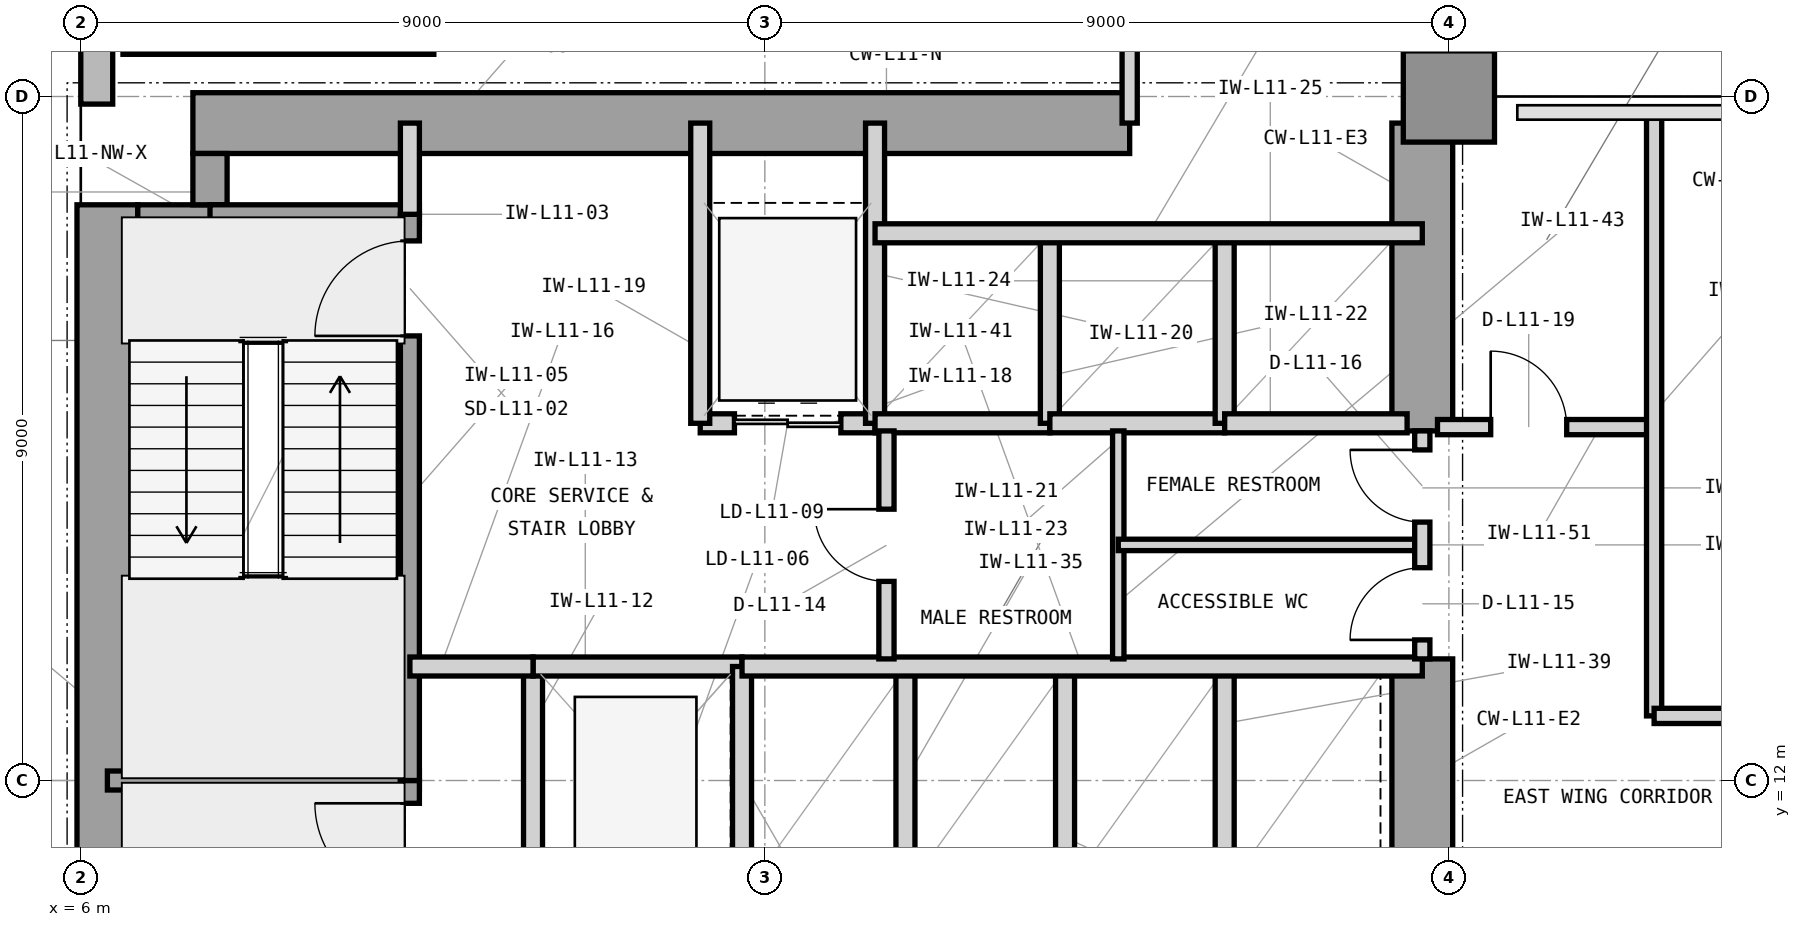
"""IFC4 building model, lengths in metres.
Left out: names, types, materials, properties, quantities, classifications, styles, units other than length and angle.
Written with IfcOpenShell. Run it as: python <this file> out.ifc"""

import sys

from ifc_helpers import new_model, si_unit, direction, frame, frame_2d, origin, origin_2d, place, context, subcontext, project, spatial, rectangle, extrude, element, fill, save


model = new_model("IFC4")
c1 = context("Model", 3, precision=1e-05, world=origin(), true_north=direction((0.0, 1.0)))
c2 = subcontext(c1, "Body", "Model", "MODEL_VIEW")
j1 = project(units=[si_unit("LENGTHUNIT", "METRE"), si_unit("PLANEANGLEUNIT", "RADIAN")], contexts=[c1])
p1 = place(None, origin())
s1 = spatial("IfcSite", under=j1, at=p1, CompositionType="ELEMENT")
p2 = place(p1, origin())
s2 = spatial("IfcBuilding", under=s1, at=p2, CompositionType="ELEMENT")
p3 = place(p2, frame((0.0, 0.0, 51.0)))
s3 = spatial("IfcBuildingStorey", under=s2, at=p3, CompositionType="ELEMENT", Elevation=51.0)
p4 = place(p3, frame((6.35, 4.425, 0.0), z_axis=(0.0, 0.0, 1.0), x_axis=(0.0, 1.0, 0.0)))
e1 = element("IfcWall", 1, at=p4, inside=s3, PredefinedType="SHEAR", context=c2, shape_type="SweptSolid", body=[
    extrude(rectangle(XDim=15.15, YDim=0.8, at=frame_2d((7.575, 0.0))), origin(), (0.0, 0.0, 1.0), 4.2),
])
p5 = place(p3, frame((7.475, 20.65, 0.0), z_axis=(0.0, 0.0, 1.0), x_axis=(1.0, 0.0, 0.0)))
e2 = element("IfcWall", 2, at=p5, inside=s3, PredefinedType="SHEAR", context=c2, shape_type="SweptSolid", body=[
    extrude(rectangle(XDim=12.325, YDim=0.8, at=frame_2d((6.163, 0.0))), origin(), (0.0, 0.0, 1.0), 4.2),
])
p6 = place(p3, frame((23.65, 10.4, 0.0), z_axis=(0.0, 0.0, 1.0), x_axis=(0.0, 1.0, 0.0)))
e3 = element("IfcWall", 3, at=p6, inside=s3, PredefinedType="SHEAR", context=c2, shape_type="SweptSolid", body=[
    extrude(rectangle(XDim=3.2, YDim=0.8, at=frame_2d((1.6, 0.0))), origin(), (0.0, 0.0, 1.0), 4.2),
])
p7 = place(p3, frame((23.65, 16.6, 0.0), z_axis=(0.0, 0.0, 1.0), x_axis=(0.0, 1.0, 0.0)))
e4 = element("IfcWall", 4, at=p7, inside=s3, PredefinedType="SHEAR", context=c2, shape_type="SweptSolid", body=[
    extrude(rectangle(XDim=4.05, YDim=0.8, at=frame_2d((2.025, 0.0))), origin(), (0.0, 0.0, 1.0), 4.2),
])
p8 = place(p3, frame((6.75, 19.35, 0.0), z_axis=(0.0, 0.0, 1.0), x_axis=(1.0, 0.0, 0.0)))
e5 = element("IfcWall", 5, at=p8, inside=s3, PredefinedType="SHEAR", context=c2, shape_type="SweptSolid", body=[
    extrude(rectangle(XDim=1.175, YDim=0.45, at=frame_2d((0.587, 0.0))), origin(), (0.0, 0.0, 1.0), 4.2),
])
p9 = place(p3, frame((7.7, 19.575, 0.0), z_axis=(0.0, 0.0, 1.0), x_axis=(0.0, 1.0, 0.0)))
e6 = element("IfcWall", 6, at=p9, inside=s3, PredefinedType="SHEAR", context=c2, shape_type="SweptSolid", body=[
    extrude(rectangle(XDim=0.675, YDim=0.45, at=frame_2d((0.337, 0.0))), origin(), (0.0, 0.0, 1.0), 4.2),
])
p10 = place(p3, frame((24.0, 21.0, 0.0), z_axis=(0.0, 0.0, 1.0), x_axis=(1.0, 0.0, 0.0)))
e7 = element("IfcColumn", 7, at=p10, inside=s3, PredefinedType="COLUMN", context=c2, shape_type="SweptSolid", body=[
    extrude(rectangle(XDim=1.2, YDim=1.2, at=origin_2d()), origin(), (0.0, 0.0, 1.0), 4.2),
])
p11 = place(p3, frame((23.79, 21.0, 0.0), z_axis=(0.0, 0.0, 1.0), x_axis=(0.0, 1.0, 0.0)))
e8 = element("IfcWall", 8, at=p11, inside=s3, PredefinedType="STANDARD", context=c2, shape_type="SweptSolid", body=[
    extrude(rectangle(XDim=28.4, YDim=0.42, at=frame_2d((14.2, 0.0))), origin(), (0.0, 0.0, 1.0), 3.98),
])
p12 = place(p11, frame((10.433, 0.0, 0.85)))
e9 = element("IfcOpeningElement", 9, at=p12, cuts=e8, PredefinedType="OPENING", context=c2, shape_type="SweptSolid", body=[
    extrude(rectangle(XDim=2.8, YDim=2.45, at=frame_2d((1.4, 1.225))), frame((0.0, 0.22, 0.0), z_axis=(0.0, -1.0, 0.0), x_axis=(1.0, 0.0, 0.0)), (0.0, 0.0, 1.0), 0.44),
])
p13 = place(p3, frame((6.21, 49.4, 0.0), z_axis=(0.0, 0.0, 1.0), x_axis=(0.0, -1.0, 0.0)))
e10 = element("IfcWall", 10, at=p13, inside=s3, PredefinedType="STANDARD", context=c2, shape_type="SweptSolid", body=[
    extrude(rectangle(XDim=28.5, YDim=0.42, at=frame_2d((14.25, 0.0))), origin(), (0.0, 0.0, 1.0), 3.98),
])
p14 = place(p13, frame((15.225, 0.0, 0.85)))
e11 = element("IfcOpeningElement", 11, at=p14, cuts=e10, PredefinedType="OPENING", context=c2, shape_type="SweptSolid", body=[
    extrude(rectangle(XDim=2.8, YDim=2.45, at=frame_2d((1.4, 1.225))), frame((0.0, 0.22, 0.0), z_axis=(0.0, -1.0, 0.0), x_axis=(1.0, 0.0, 0.0)), (0.0, 0.0, 1.0), 0.44),
])
p15 = place(p13, frame((8.436, 0.0, 0.85)))
e12 = element("IfcOpeningElement", 12, at=p15, cuts=e10, PredefinedType="OPENING", context=c2, shape_type="SweptSolid", body=[
    extrude(rectangle(XDim=1.2, YDim=2.45, at=frame_2d((0.6, 1.225))), frame((0.0, 0.22, 0.0), z_axis=(0.0, -1.0, 0.0), x_axis=(1.0, 0.0, 0.0)), (0.0, 0.0, 1.0), 0.44),
])
p16 = place(p3, frame((6.35, 12.0, 0.0), z_axis=(0.0, 0.0, 1.0), x_axis=(1.0, 0.0, 0.0)))
e13 = element("IfcWall", 13, at=p16, inside=s3, PredefinedType="SHEAR", context=c2, shape_type="SweptSolid", body=[
    extrude(rectangle(XDim=4.105, YDim=0.25, at=frame_2d((2.052, 0.0))), origin(), (0.0, 0.0, 1.0), 4.2),
])
p17 = place(p3, frame((7.7, 19.45, 0.0), z_axis=(0.0, 0.0, 1.0), x_axis=(1.0, 0.0, 0.0)))
e14 = element("IfcWall", 14, at=p17, inside=s3, PredefinedType="SHEAR", context=c2, shape_type="SweptSolid", body=[
    extrude(rectangle(XDim=2.755, YDim=0.25, at=frame_2d((1.377, 0.0))), origin(), (0.0, 0.0, 1.0), 4.2),
])
p18 = place(p3, frame((10.33, 4.55, 0.0), z_axis=(0.0, 0.0, 1.0), x_axis=(0.0, 1.0, 0.0)))
e15 = element("IfcWall", 15, at=p18, inside=s3, PredefinedType="SHEAR", context=c2, shape_type="SweptSolid", body=[
    extrude(rectangle(XDim=7.45, YDim=0.25, at=frame_2d((3.725, 0.0))), origin(), (0.0, 0.0, 1.0), 4.2),
])
p19 = place(p18, frame((5.9, 0.0, 0.0)))
e16 = element("IfcOpeningElement", 16, at=p19, cuts=e15, PredefinedType="OPENING", context=c2, shape_type="SweptSolid", body=[
    extrude(rectangle(XDim=1.25, YDim=2.2, at=frame_2d((0.625, 1.1))), frame((0.0, 0.135, 0.0), z_axis=(0.0, -1.0, 0.0), x_axis=(1.0, 0.0, 0.0)), (0.0, 0.0, 1.0), 0.27),
])
p20 = place(p3, frame((10.33, 12.0, 0.0), z_axis=(0.0, 0.0, 1.0), x_axis=(0.0, 1.0, 0.0)))
e17 = element("IfcWall", 17, at=p20, inside=s3, PredefinedType="SHEAR", context=c2, shape_type="SweptSolid", body=[
    extrude(rectangle(XDim=7.45, YDim=0.25, at=frame_2d((3.725, 0.0))), origin(), (0.0, 0.0, 1.0), 4.2),
])
p21 = place(p20, frame((5.85, 0.0, 0.0)))
e18 = element("IfcOpeningElement", 18, at=p21, cuts=e17, PredefinedType="OPENING", context=c2, shape_type="SweptSolid", body=[
    extrude(rectangle(XDim=1.25, YDim=2.2, at=frame_2d((0.625, 1.1))), frame((0.0, 0.135, 0.0), z_axis=(0.0, -1.0, 0.0), x_axis=(1.0, 0.0, 0.0)), (0.0, 0.0, 1.0), 0.27),
])
p22 = place(p3, frame((10.33, 19.45, 0.0), z_axis=(0.0, 0.0, 1.0), x_axis=(0.0, 1.0, 0.0)))
e19 = element("IfcWall", 19, at=p22, inside=s3, PredefinedType="PARTITIONING", context=c2, shape_type="SweptSolid", body=[
    extrude(rectangle(XDim=1.2, YDim=0.25, at=frame_2d((0.6, 0.0))), origin(), (0.0, 0.0, 1.0), 3.114),
])
p23 = place(p3, frame((11.95, 10.5, 0.0), z_axis=(0.0, 0.0, 1.0), x_axis=(0.0, 1.0, 0.0)))
e20 = element("IfcWall", 20, at=p23, inside=s3, PredefinedType="PARTITIONING", context=c2, shape_type="SweptSolid", body=[
    extrude(rectangle(XDim=3.0, YDim=0.25, at=frame_2d((1.5, 0.0))), origin(), (0.0, 0.0, 1.0), 3.97),
])
p24 = place(p3, frame((11.95, 13.5, 0.0), z_axis=(0.0, 0.0, 1.0), x_axis=(1.0, 0.0, 0.0)))
e21 = element("IfcWall", 21, at=p24, inside=s3, PredefinedType="PARTITIONING", context=c2, shape_type="SweptSolid", body=[
    extrude(rectangle(XDim=2.75, YDim=0.25, at=frame_2d((1.375, 0.0))), origin(), (0.0, 0.0, 1.0), 3.426),
])
p25 = place(p3, frame((14.7, 10.5, 0.0), z_axis=(0.0, 0.0, 1.0), x_axis=(0.0, 1.0, 0.0)))
e22 = element("IfcWall", 22, at=p25, inside=s3, PredefinedType="PARTITIONING", context=c2, shape_type="SweptSolid", body=[
    extrude(rectangle(XDim=3.0, YDim=0.25, at=frame_2d((1.5, 0.0))), origin(), (0.0, 0.0, 1.0), 3.97),
])
p26 = place(p3, frame((10.33, 13.5, 0.0), z_axis=(0.0, 0.0, 1.0), x_axis=(1.0, 0.0, 0.0)))
e23 = element("IfcWall", 23, at=p26, inside=s3, PredefinedType="PARTITIONING", context=c2, shape_type="SweptSolid", body=[
    extrude(rectangle(XDim=1.62, YDim=0.25, at=frame_2d((0.81, 0.0))), origin(), (0.0, 0.0, 1.0), 3.426),
])
p27 = place(p3, frame((14.15, 16.7, 0.0), z_axis=(0.0, 0.0, 1.0), x_axis=(1.0, 0.0, 0.0)))
e24 = element("IfcWall", 24, at=p27, inside=s3, PredefinedType="PARTITIONING", context=c2, shape_type="SweptSolid", body=[
    extrude(rectangle(XDim=2.3, YDim=0.25, at=frame_2d((1.15, 0.0))), origin(), (0.0, 0.0, 1.0), 3.426),
])
p28 = place(p27, frame((0.45, 0.0, 0.0)))
e25 = element("IfcOpeningElement", 25, at=p28, cuts=e24, PredefinedType="OPENING", context=c2, shape_type="SweptSolid", body=[
    extrude(rectangle(XDim=1.4, YDim=2.35, at=frame_2d((0.7, 1.175))), frame((0.0, 0.135, 0.0), z_axis=(0.0, -1.0, 0.0), x_axis=(1.0, 0.0, 0.0)), (0.0, 0.0, 1.0), 0.27),
])
for number, where, z_axis, x_axis in (
    (26, (14.15, 16.7, 0.0), (0.0, 0.0, 1.0), (0.0, 1.0, 0.0)),
    (27, (16.45, 16.7, 0.0), (0.0, 0.0, 1.0), (0.0, 1.0, 0.0)),
):
    element("IfcWall", number, at=place(p3, frame(where, z_axis=z_axis, x_axis=x_axis)), inside=s3, PredefinedType="PARTITIONING", context=c2, shape_type="SweptSolid", body=[
        extrude(rectangle(XDim=3.95, YDim=0.25, at=frame_2d((1.975, 0.0))), origin(), (0.0, 0.0, 1.0), 3.97),
    ])
p29 = place(p3, frame((16.45, 16.7, 0.0), z_axis=(0.0, 0.0, 1.0), x_axis=(1.0, 0.0, 0.0)))
e28 = element("IfcWall", 28, at=p29, inside=s3, PredefinedType="PARTITIONING", context=c2, shape_type="SweptSolid", body=[
    extrude(rectangle(XDim=2.3, YDim=0.25, at=frame_2d((1.15, 0.0))), origin(), (0.0, 0.0, 1.0), 3.426),
])
p30 = place(p3, frame((18.75, 16.7, 0.0), z_axis=(0.0, 0.0, 1.0), x_axis=(0.0, 1.0, 0.0)))
e29 = element("IfcWall", 29, at=p30, inside=s3, PredefinedType="PARTITIONING", context=c2, shape_type="SweptSolid", body=[
    extrude(rectangle(XDim=2.5, YDim=0.25, at=frame_2d((1.25, 0.0))), origin(), (0.0, 0.0, 1.0), 3.97),
])
p31 = place(p3, frame((18.75, 16.7, 0.0), z_axis=(0.0, 0.0, 1.0), x_axis=(1.0, 0.0, 0.0)))
e30 = element("IfcWall", 30, at=p31, inside=s3, PredefinedType="PARTITIONING", context=c2, shape_type="SweptSolid", body=[
    extrude(rectangle(XDim=2.3, YDim=0.25, at=frame_2d((1.15, 0.0))), origin(), (0.0, 0.0, 1.0), 3.426),
])
p32 = place(p3, frame((21.05, 16.7, 0.0), z_axis=(0.0, 0.0, 1.0), x_axis=(0.0, 1.0, 0.0)))
e31 = element("IfcWall", 31, at=p32, inside=s3, PredefinedType="PARTITIONING", context=c2, shape_type="SweptSolid", body=[
    extrude(rectangle(XDim=2.5, YDim=0.25, at=frame_2d((1.25, 0.0))), origin(), (0.0, 0.0, 1.0), 3.97),
])
p33 = place(p3, frame((21.05, 16.7, 0.0), z_axis=(0.0, 0.0, 1.0), x_axis=(1.0, 0.0, 0.0)))
e32 = element("IfcWall", 32, at=p33, inside=s3, PredefinedType="PARTITIONING", context=c2, shape_type="SweptSolid", body=[
    extrude(rectangle(XDim=2.4, YDim=0.25, at=frame_2d((1.2, 0.0))), origin(), (0.0, 0.0, 1.0), 3.426),
])
p34 = place(p3, frame((16.45, 19.2, 0.0), z_axis=(0.0, 0.0, 1.0), x_axis=(1.0, 0.0, 0.0)))
e33 = element("IfcWall", 33, at=p34, inside=s3, PredefinedType="PARTITIONING", context=c2, shape_type="SweptSolid", body=[
    extrude(rectangle(XDim=7.2, YDim=0.25, at=frame_2d((3.6, 0.0))), origin(), (0.0, 0.0, 1.0), 3.97),
])
for number, where, z_axis, x_axis in (
    (34, (16.85, 10.5, 0.0), (0.0, 0.0, 1.0), (0.0, 1.0, 0.0)),
    (35, (18.95, 10.5, 0.0), (0.0, 0.0, 1.0), (0.0, 1.0, 0.0)),
    (36, (21.05, 10.5, 0.0), (0.0, 0.0, 1.0), (0.0, 1.0, 0.0)),
):
    element("IfcWall", number, at=place(p3, frame(where, z_axis=z_axis, x_axis=x_axis)), inside=s3, PredefinedType="PARTITIONING", context=c2, shape_type="SweptSolid", body=[
        extrude(rectangle(XDim=3.0, YDim=0.25, at=frame_2d((1.5, 0.0))), origin(), (0.0, 0.0, 1.0), 3.97),
    ])
p35 = place(p3, frame((14.7, 13.5, 0.0), z_axis=(0.0, 0.0, 1.0), x_axis=(1.0, 0.0, 0.0)))
e37 = element("IfcWall", 37, at=p35, inside=s3, PredefinedType="PARTITIONING", context=c2, shape_type="SweptSolid", body=[
    extrude(rectangle(XDim=8.95, YDim=0.25, at=frame_2d((4.475, 0.0))), origin(), (0.0, 0.0, 1.0), 3.426),
])
p36 = place(p3, frame((16.6, 13.6, 0.0), z_axis=(0.0, 0.0, 1.0), x_axis=(0.0, 1.0, 0.0)))
e38 = element("IfcWall", 38, at=p36, inside=s3, PredefinedType="PARTITIONING", context=c2, shape_type="SweptSolid", body=[
    extrude(rectangle(XDim=3.0, YDim=0.2, at=frame_2d((1.5, 0.0))), origin(), (0.0, 0.0, 1.0), 3.97),
])
p37 = place(p36, frame((1.02, 0.0, 0.0)))
e39 = element("IfcOpeningElement", 39, at=p37, cuts=e38, PredefinedType="OPENING", context=c2, shape_type="SweptSolid", body=[
    extrude(rectangle(XDim=0.95, YDim=2.1, at=frame_2d((0.475, 1.05))), frame((0.0, 0.11, 0.0), z_axis=(0.0, -1.0, 0.0), x_axis=(1.0, 0.0, 0.0)), (0.0, 0.0, 1.0), 0.22),
])
p38 = place(p3, frame((19.65, 13.6, 0.0), z_axis=(0.0, 0.0, 1.0), x_axis=(0.0, 1.0, 0.0)))
e40 = element("IfcWall", 40, at=p38, inside=s3, PredefinedType="PARTITIONING", context=c2, shape_type="SweptSolid", body=[
    extrude(rectangle(XDim=3.0, YDim=0.15, at=frame_2d((1.5, 0.0))), origin(), (0.0, 0.0, 1.0), 3.97),
])
p39 = place(p3, frame((19.65, 15.1, 0.0), z_axis=(0.0, 0.0, 1.0), x_axis=(1.0, 0.0, 0.0)))
e41 = element("IfcWall", 41, at=p39, inside=s3, PredefinedType="PARTITIONING", context=c2, shape_type="SweptSolid", body=[
    extrude(rectangle(XDim=4.0, YDim=0.15, at=frame_2d((2.0, 0.0))), origin(), (0.0, 0.0, 1.0), 3.97),
])
p40 = place(p3, frame((23.65, 13.6, 0.0), z_axis=(0.0, 0.0, 1.0), x_axis=(0.0, 1.0, 0.0)))
e42 = element("IfcWall", 42, at=p40, inside=s3, PredefinedType="PARTITIONING", context=c2, shape_type="SweptSolid", body=[
    extrude(rectangle(XDim=3.0, YDim=0.2, at=frame_2d((1.5, 0.0))), origin(), (0.0, 0.0, 1.0), 3.97),
])
p41 = place(p40, frame((0.25, 0.0, 0.0)))
e43 = element("IfcOpeningElement", 43, at=p41, cuts=e42, PredefinedType="OPENING", context=c2, shape_type="SweptSolid", body=[
    extrude(rectangle(XDim=0.95, YDim=2.1, at=frame_2d((0.475, 1.05))), frame((0.0, 0.11, 0.0), z_axis=(0.0, -1.0, 0.0), x_axis=(1.0, 0.0, 0.0)), (0.0, 0.0, 1.0), 0.22),
])
p42 = place(p40, frame((1.8, 0.0, 0.0)))
e44 = element("IfcOpeningElement", 44, at=p42, cuts=e42, PredefinedType="OPENING", context=c2, shape_type="SweptSolid", body=[
    extrude(rectangle(XDim=0.95, YDim=2.1, at=frame_2d((0.475, 1.05))), frame((0.0, 0.11, 0.0), z_axis=(0.0, -1.0, 0.0), x_axis=(1.0, 0.0, 0.0)), (0.0, 0.0, 1.0), 0.22),
])
p43 = place(p3, frame((6.555, 21.68, 0.0), z_axis=(0.0, 0.0, 1.0), x_axis=(1.0, 0.0, 0.0)))
e45 = element("IfcWall", 45, at=p43, inside=s3, PredefinedType="SHEAR", context=c2, shape_type="SweptSolid", body=[
    extrude(rectangle(XDim=4.09, YDim=0.25, at=frame_2d((2.045, 0.0))), origin(), (0.0, 0.0, 1.0), 4.2),
])
p44 = place(p3, frame((23.85, 16.65, 0.0), z_axis=(0.0, 0.0, 1.0), x_axis=(1.0, 0.0, 0.0)))
e46 = element("IfcWall", 46, at=p44, inside=s3, PredefinedType="PARTITIONING", context=c2, shape_type="SweptSolid", body=[
    extrude(rectangle(XDim=2.85, YDim=0.2, at=frame_2d((1.425, 0.0))), origin(), (0.0, 0.0, 1.0), 3.97),
])
p45 = place(p44, frame((0.7, 0.0, 0.0)))
e47 = element("IfcOpeningElement", 47, at=p45, cuts=e46, PredefinedType="OPENING", context=c2, shape_type="SweptSolid", body=[
    extrude(rectangle(XDim=1.0, YDim=2.15, at=frame_2d((0.5, 1.075))), frame((0.0, 0.11, 0.0), z_axis=(0.0, -1.0, 0.0), x_axis=(1.0, 0.0, 0.0)), (0.0, 0.0, 1.0), 0.22),
])
p46 = place(p3, frame((26.7, 12.85, 0.0), z_axis=(0.0, 0.0, 1.0), x_axis=(0.0, 1.0, 0.0)))
e48 = element("IfcWall", 48, at=p46, inside=s3, PredefinedType="PARTITIONING", context=c2, shape_type="SweptSolid", body=[
    extrude(rectangle(XDim=7.97, YDim=0.2, at=frame_2d((3.985, 0.0))), origin(), (0.0, 0.0, 1.0), 3.97),
])
p47 = place(p3, frame((26.7, 12.85, 0.0), z_axis=(0.0, 0.0, 1.0), x_axis=(1.0, 0.0, 0.0)))
e49 = element("IfcWall", 49, at=p47, inside=s3, PredefinedType="PARTITIONING", context=c2, shape_type="SweptSolid", body=[
    extrude(rectangle(XDim=6.0, YDim=0.2, at=frame_2d((3.0, 0.0))), origin(), (0.0, 0.0, 1.0), 3.97),
])
p48 = place(p47, frame((2.25, 0.0, 0.0)))
e50 = element("IfcOpeningElement", 50, at=p48, cuts=e49, PredefinedType="OPENING", context=c2, shape_type="SweptSolid", body=[
    extrude(rectangle(XDim=1.5, YDim=2.3, at=frame_2d((0.75, 1.15))), frame((0.0, 0.11, 0.0), z_axis=(0.0, -1.0, 0.0), x_axis=(1.0, 0.0, 0.0)), (0.0, 0.0, 1.0), 0.22),
])
p49 = place(p3, frame((19.8, 20.65, 0.0), z_axis=(0.0, 0.0, 1.0), x_axis=(0.0, 1.0, 0.0)))
e51 = element("IfcWall", 51, at=p49, inside=s3, PredefinedType="PARTITIONING", context=c2, shape_type="SweptSolid", body=[
    extrude(rectangle(XDim=6.15, YDim=0.2, at=frame_2d((3.075, 0.0))), origin(), (0.0, 0.0, 1.0), 3.97),
])
p50 = place(p19, origin())
e52 = element("IfcDoor", 52, at=p50, inside=s3, OperationType="SINGLE_SWING_RIGHT", PredefinedType="DOOR", context=c2, shape_type="SweptSolid", body=[
    extrude(rectangle(XDim=1.25, YDim=2.2, at=frame_2d((0.625, 1.1))), frame((0.0, 0.025, 0.0), z_axis=(0.0, -1.0, 0.0), x_axis=(1.0, 0.0, 0.0)), (0.0, 0.0, 1.0), 0.05),
])
fill(e16, e52)
p51 = place(p21, origin())
e53 = element("IfcDoor", 53, at=p51, inside=s3, OperationType="SINGLE_SWING_LEFT", PredefinedType="DOOR", context=c2, shape_type="SweptSolid", body=[
    extrude(rectangle(XDim=1.25, YDim=2.2, at=frame_2d((0.625, 1.1))), frame((0.0, 0.025, 0.0), z_axis=(0.0, -1.0, 0.0), x_axis=(1.0, 0.0, 0.0)), (0.0, 0.0, 1.0), 0.05),
])
fill(e18, e53)
p52 = place(p28, origin())
e54 = element("IfcDoor", 54, at=p52, inside=s3, OperationType="DOUBLE_DOOR_SLIDING", PredefinedType="DOOR", context=c2, shape_type="SweptSolid", body=[
    extrude(rectangle(XDim=1.4, YDim=2.35, at=frame_2d((0.7, 1.175))), frame((0.0, 0.025, 0.0), z_axis=(0.0, -1.0, 0.0), x_axis=(1.0, 0.0, 0.0)), (0.0, 0.0, 1.0), 0.05),
])
fill(e25, e54)
p53 = place(p37, origin())
e55 = element("IfcDoor", 55, at=p53, inside=s3, OperationType="SINGLE_SWING_RIGHT", PredefinedType="DOOR", context=c2, shape_type="SweptSolid", body=[
    extrude(rectangle(XDim=0.95, YDim=2.1, at=frame_2d((0.475, 1.05))), frame((0.0, 0.025, 0.0), z_axis=(0.0, -1.0, 0.0), x_axis=(1.0, 0.0, 0.0)), (0.0, 0.0, 1.0), 0.05),
])
fill(e39, e55)
p54 = place(p41, origin())
e56 = element("IfcDoor", 56, at=p54, inside=s3, OperationType="SINGLE_SWING_LEFT", PredefinedType="DOOR", context=c2, shape_type="SweptSolid", body=[
    extrude(rectangle(XDim=0.95, YDim=2.1, at=frame_2d((0.475, 1.05))), frame((0.0, 0.025, 0.0), z_axis=(0.0, -1.0, 0.0), x_axis=(1.0, 0.0, 0.0)), (0.0, 0.0, 1.0), 0.05),
])
fill(e43, e56)
p55 = place(p42, origin())
e57 = element("IfcDoor", 57, at=p55, inside=s3, OperationType="SINGLE_SWING_RIGHT", PredefinedType="DOOR", context=c2, shape_type="SweptSolid", body=[
    extrude(rectangle(XDim=0.95, YDim=2.1, at=frame_2d((0.475, 1.05))), frame((0.0, 0.025, 0.0), z_axis=(0.0, -1.0, 0.0), x_axis=(1.0, 0.0, 0.0)), (0.0, 0.0, 1.0), 0.05),
])
fill(e44, e57)
p56 = place(p45, origin())
e58 = element("IfcDoor", 58, at=p56, inside=s3, OperationType="SINGLE_SWING_LEFT", PredefinedType="DOOR", context=c2, shape_type="SweptSolid", body=[
    extrude(rectangle(XDim=1.0, YDim=2.15, at=frame_2d((0.5, 1.075))), frame((0.0, 0.025, 0.0), z_axis=(0.0, -1.0, 0.0), x_axis=(1.0, 0.0, 0.0)), (0.0, 0.0, 1.0), 0.05),
])
fill(e47, e58)
save(model, sys.argv[1])
